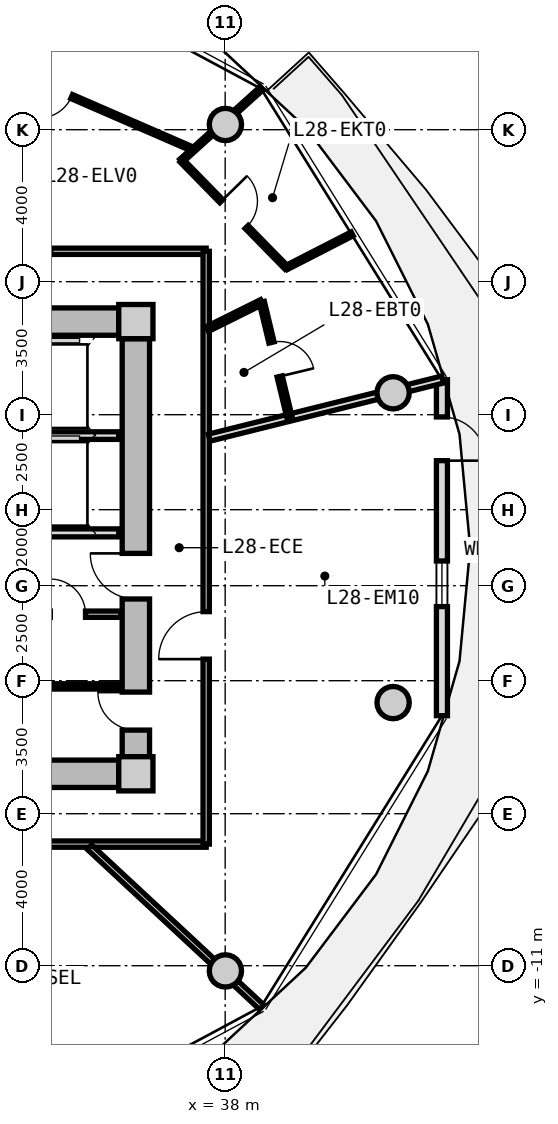
"""IFC4 building model, lengths in metres.
Left out: names, types, materials, properties, quantities, classifications, styles, units other than length and angle.
Written with IfcOpenShell. Run it as: python <this file> out.ifc"""

import sys

from ifc_helpers import new_model, si_unit, direction, frame, frame_2d, origin, origin_2d, place, context, subcontext, project, spatial, rectangle, circle, extrude, source, transform, mapped, element, fill, save


model = new_model("IFC4")
c1 = context("Model", 3, precision=1e-05, world=origin(), true_north=direction((0.0, 1.0)))
c2 = subcontext(c1, "Body", "Model", "MODEL_VIEW")
j1 = project(units=[si_unit("LENGTHUNIT", "METRE"), si_unit("PLANEANGLEUNIT", "RADIAN")], contexts=[c1])
p1 = place(None, origin())
s1 = spatial("IfcSite", under=j1, at=p1, CompositionType="ELEMENT")
p2 = place(p1, origin())
s2 = spatial("IfcBuilding", under=s1, at=p2, CompositionType="ELEMENT")
p3 = place(p2, frame((0.0, 0.0, 93.2)))
s3 = spatial("IfcBuildingStorey", under=s2, at=p3, CompositionType="ELEMENT", Elevation=93.2)
m1 = source(origin(), c2, "Body", "SweptSolid", [
    extrude(rectangle(XDim=0.9, YDim=0.9, at=origin_2d()), origin(), (0.0, 0.0, 1.0), 3.05),
])
for number, where, z_axis, x_axis in (
    (1, (35.65, -5.95, 0.0), (0.0, 0.0, 1.0), (1.0, 0.0, 0.0)),
    (2, (35.65, 5.95, 0.0), (0.0, 0.0, 1.0), (1.0, 0.0, 0.0)),
):
    element("IfcColumn", number, at=place(p3, frame(where, z_axis=z_axis, x_axis=x_axis)), inside=s3, PredefinedType="COLUMN", context=c2, shape_type="MappedRepresentation", body=[
        mapped(m1, transform((0.0, 0.0, 0.0), x_axis=(1.0, 0.0, 0.0), y_axis=(0.0, 1.0, 0.0), z_axis=(0.0, 0.0, 1.0), scale=1.0)),
    ])
m2 = source(origin(), c2, "Body", "SweptSolid", [
    extrude(rectangle(XDim=14.4, YDim=0.72, at=frame_2d((7.2, 0.0))), origin(), (0.0, 0.0, 1.0), 2.79),
])
for number, where, z_axis, x_axis in (
    (3, (20.8, 5.95, 0.0), (0.0, 0.0, 1.0), (1.0, 0.0, 0.0)),
    (4, (35.2, -5.95, 0.0), (0.0, 0.0, 1.0), (-1.0, 0.0, 0.0)),
):
    element("IfcWall", number, at=place(p3, frame(where, z_axis=z_axis, x_axis=x_axis)), inside=s3, PredefinedType="SHEAR", context=c2, shape_type="MappedRepresentation", body=[
        mapped(m2, transform((0.0, 0.0, 0.0), x_axis=(1.0, 0.0, 0.0), y_axis=(0.0, 1.0, 0.0), z_axis=(0.0, 0.0, 1.0), scale=1.0)),
    ])
m3 = source(origin(), c2, "Body", "SweptSolid", [
    extrude(rectangle(XDim=11.0, YDim=0.72, at=frame_2d((5.5, 0.0))), origin(), (0.0, 0.0, 1.0), 2.79),
])
p4 = place(p3, frame((35.65, 5.5, 0.0), z_axis=(0.0, 0.0, 1.0), x_axis=(0.0, -1.0, 0.0)))
e5 = element("IfcWall", 5, at=p4, inside=s3, PredefinedType="SHEAR", context=c2, shape_type="MappedRepresentation", body=[
    mapped(m3, transform((0.0, 0.0, 0.0), x_axis=(1.0, 0.0, 0.0), y_axis=(0.0, 1.0, 0.0), z_axis=(0.0, 0.0, 1.0), scale=1.0)),
])
p5 = place(p4, frame((5.65, 0.0, 0.0)))
e6 = element("IfcOpeningElement", 6, at=p5, cuts=e5, PredefinedType="OPENING", context=c2, shape_type="SweptSolid", body=[
    extrude(rectangle(XDim=1.2, YDim=2.15, at=frame_2d((0.6, 1.075))), frame((0.0, 0.37, 0.0), z_axis=(0.0, -1.0, 0.0), x_axis=(1.0, 0.0, 0.0)), (0.0, 0.0, 1.0), 0.74),
])
p6 = place(p4, frame((9.3, 0.0, 0.0)))
e7 = element("IfcOpeningElement", 7, at=p6, cuts=e5, PredefinedType="OPENING", context=c2, shape_type="SweptSolid", body=[
    extrude(rectangle(XDim=1.0, YDim=2.1, at=frame_2d((0.5, 1.05))), frame((0.0, 0.37, 0.0), z_axis=(0.0, -1.0, 0.0), x_axis=(1.0, 0.0, 0.0)), (0.0, 0.0, 1.0), 0.74),
])
m4 = source(origin(), c2, "Body", "SweptSolid", [
    extrude(circle(Radius=0.425, at=origin_2d()), origin(), (0.0, 0.0, 1.0), 3.05),
])
for number, where, z_axis, x_axis in (
    (8, (42.419, 4.076, 0.0), (0.0, 0.0, 1.0), (1.0, 0.0, 0.0)),
    (9, (38.006, 11.137, 0.0), (0.0, 0.0, 1.0), (1.0, 0.0, 0.0)),
    (10, (38.006, -11.137, 0.0), (0.0, 0.0, 1.0), (1.0, 0.0, 0.0)),
    (11, (42.419, -4.076, 0.0), (0.0, 0.0, 1.0), (1.0, 0.0, 0.0)),
):
    element("IfcColumn", number, at=place(p3, frame(where, z_axis=z_axis, x_axis=x_axis)), inside=s3, PredefinedType="COLUMN", context=c2, shape_type="MappedRepresentation", body=[
        mapped(m4, transform((0.0, 0.0, 0.0), x_axis=(1.0, 0.0, 0.0), y_axis=(0.0, 1.0, 0.0), z_axis=(0.0, 0.0, 1.0), scale=1.0)),
    ])
m5 = source(origin(), c2, "Body", "SweptSolid", [
    extrude(rectangle(XDim=8.841, YDim=0.29, at=frame_2d((4.421, 0.0))), origin(), (0.0, 0.0, 1.0), 2.79),
])
p7 = place(p3, frame((43.704, 4.421, 0.0), z_axis=(0.0, 0.0, 1.0), x_axis=(0.0, -1.0, 0.0)))
e12 = element("IfcWall", 12, at=p7, inside=s3, PredefinedType="SOLIDWALL", context=c2, shape_type="MappedRepresentation", body=[
    mapped(m5, transform((0.0, 0.0, 0.0), x_axis=(1.0, 0.0, 0.0), y_axis=(0.0, 1.0, 0.0), z_axis=(0.0, 0.0, 1.0), scale=1.0)),
])
p8 = place(p7, frame((0.98, 0.0, 0.0)))
e13 = element("IfcOpeningElement", 13, at=p8, cuts=e12, PredefinedType="OPENING", context=c2, shape_type="SweptSolid", body=[
    extrude(rectangle(XDim=1.15, YDim=2.25, at=frame_2d((0.575, 1.125))), frame((0.0, 0.155, 0.0), z_axis=(0.0, -1.0, 0.0), x_axis=(1.0, 0.0, 0.0)), (0.0, 0.0, 1.0), 0.31),
])
p9 = place(p7, frame((4.771, 0.0, 0.85)))
e14 = element("IfcOpeningElement", 14, at=p9, cuts=e12, PredefinedType="OPENING", context=c2, shape_type="SweptSolid", body=[
    extrude(rectangle(XDim=1.2, YDim=1.5, at=frame_2d((0.6, 0.75))), frame((0.0, 0.155, 0.0), z_axis=(0.0, -1.0, 0.0), x_axis=(1.0, 0.0, 0.0)), (0.0, 0.0, 1.0), 0.31),
])
m6 = source(origin(), c2, "Body", "SweptSolid", [
    extrude(rectangle(XDim=3.2, YDim=0.2, at=frame_2d((1.6, 0.0))), origin(), (0.0, 0.0, 1.0), 2.775),
])
p10 = place(p3, frame((32.0, 2.95, 0.0), z_axis=(0.0, 0.0, 1.0), x_axis=(1.0, 0.0, 0.0)))
e15 = element("IfcWall", 15, at=p10, inside=s3, PredefinedType="PARTITIONING", context=c2, shape_type="MappedRepresentation", body=[
    mapped(m6, transform((0.0, 0.0, 0.0), x_axis=(1.0, 0.0, 0.0), y_axis=(0.0, 1.0, 0.0), z_axis=(0.0, 0.0, 1.0), scale=1.0)),
])
m7 = source(origin(), c2, "Body", "SweptSolid", [
    extrude(rectangle(XDim=6.66, YDim=0.21, at=frame_2d((3.33, 0.0))), origin(), (0.0, 0.0, 1.0), 2.775),
])
p11 = place(p3, frame((28.54, 0.39, 0.0), z_axis=(0.0, 0.0, 1.0), x_axis=(1.0, 0.0, 0.0)))
e16 = element("IfcWall", 16, at=p11, inside=s3, PredefinedType="PARTITIONING", context=c2, shape_type="MappedRepresentation", body=[
    mapped(m7, transform((0.0, 0.0, 0.0), x_axis=(1.0, 0.0, 0.0), y_axis=(0.0, 1.0, 0.0), z_axis=(0.0, 0.0, 1.0), scale=1.0)),
])
p12 = place(p11, frame((1.0, 0.0, 0.0)))
e17 = element("IfcOpeningElement", 17, at=p12, cuts=e16, PredefinedType="OPENING", context=c2, shape_type="SweptSolid", body=[
    extrude(rectangle(XDim=1.2, YDim=2.15, at=frame_2d((0.6, 1.075))), frame((0.0, 0.115, 0.0), z_axis=(0.0, -1.0, 0.0), x_axis=(1.0, 0.0, 0.0)), (0.0, 0.0, 1.0), 0.23),
])
m8 = source(origin(), c2, "Body", "SweptSolid", [
    extrude(rectangle(XDim=2.7, YDim=0.165, at=frame_2d((1.35, 0.0))), origin(), (0.0, 0.0, 1.0), 2.775),
])
p13 = place(p3, frame((32.55, -1.75, 0.0), z_axis=(0.0, 0.0, 1.0), x_axis=(1.0, 0.0, 0.0)))
e18 = element("IfcWall", 18, at=p13, inside=s3, PredefinedType="PARTITIONING", context=c2, shape_type="MappedRepresentation", body=[
    mapped(m8, transform((0.0, 0.0, 0.0), x_axis=(1.0, 0.0, 0.0), y_axis=(0.0, 1.0, 0.0), z_axis=(0.0, 0.0, 1.0), scale=1.0)),
])
p14 = place(p13, frame((0.85, 0.0, 0.0)))
e19 = element("IfcOpeningElement", 19, at=p14, cuts=e18, PredefinedType="OPENING", context=c2, shape_type="SweptSolid", body=[
    extrude(rectangle(XDim=0.925, YDim=2.1, at=frame_2d((0.462, 1.05))), frame((0.0, 0.093, 0.0), z_axis=(0.0, -1.0, 0.0), x_axis=(1.0, 0.0, 0.0)), (0.0, 0.0, 1.0), 0.185),
])
m9 = source(origin(), c2, "Body", "SweptSolid", [
    extrude(rectangle(XDim=2.7, YDim=0.14, at=frame_2d((1.35, 0.0))), origin(), (0.0, 0.0, 1.0), 2.775),
])
p15 = place(p3, frame((32.55, -3.65, 0.0), z_axis=(0.0, 0.0, 1.0), x_axis=(1.0, 0.0, 0.0)))
e20 = element("IfcWall", 20, at=p15, inside=s3, PredefinedType="PARTITIONING", context=c2, shape_type="MappedRepresentation", body=[
    mapped(m9, transform((0.0, 0.0, 0.0), x_axis=(1.0, 0.0, 0.0), y_axis=(0.0, 1.0, 0.0), z_axis=(0.0, 0.0, 1.0), scale=1.0)),
])
m10 = source(origin(), c2, "Body", "SweptSolid", [
    extrude(rectangle(XDim=9.234, YDim=0.165, at=frame_2d((4.617, 0.0))), origin(), (0.0, 0.0, 1.0), 2.775),
])
p16 = place(p3, frame((28.266, 7.8, 0.0), z_axis=(0.0, 0.0, 1.0), x_axis=(1.0, 0.0, 0.0)))
e21 = element("IfcWall", 21, at=p16, inside=s3, PredefinedType="PARTITIONING", context=c2, shape_type="MappedRepresentation", body=[
    mapped(m10, transform((0.0, 0.0, 0.0), x_axis=(1.0, 0.0, 0.0), y_axis=(0.0, 1.0, 0.0), z_axis=(0.0, 0.0, 1.0), scale=1.0)),
])
p17 = place(p16, frame((4.092, 0.0, 0.0)))
e22 = element("IfcOpeningElement", 22, at=p17, cuts=e21, PredefinedType="OPENING", context=c2, shape_type="SweptSolid", body=[
    extrude(rectangle(XDim=1.05, YDim=2.15, at=frame_2d((0.525, 1.075))), frame((0.0, 0.093, 0.0), z_axis=(0.0, -1.0, 0.0), x_axis=(1.0, 0.0, 0.0)), (0.0, 0.0, 1.0), 0.185),
])
m11 = source(origin(), c2, "Body", "SweptSolid", [
    extrude(rectangle(XDim=8.6, YDim=0.165, at=frame_2d((4.3, 0.0))), origin(), (0.0, 0.0, 1.0), 2.775),
])
p18 = place(p3, frame((37.5, -7.8, 0.0), z_axis=(0.0, 0.0, 1.0), x_axis=(-1.0, 0.0, 0.0)))
e23 = element("IfcWall", 23, at=p18, inside=s3, PredefinedType="PARTITIONING", context=c2, shape_type="MappedRepresentation", body=[
    mapped(m11, transform((0.0, 0.0, 0.0), x_axis=(1.0, 0.0, 0.0), y_axis=(0.0, 1.0, 0.0), z_axis=(0.0, 0.0, 1.0), scale=1.0)),
])
m12 = source(origin(), c2, "Body", "SweptSolid", [
    extrude(rectangle(XDim=15.6, YDim=0.165, at=frame_2d((7.8, 0.0))), origin(), (0.0, 0.0, 1.0), 2.775),
])
p19 = place(p3, frame((37.5, 7.8, 0.0), z_axis=(0.0, 0.0, 1.0), x_axis=(0.0, -1.0, 0.0)))
e24 = element("IfcWall", 24, at=p19, inside=s3, PredefinedType="PARTITIONING", context=c2, shape_type="MappedRepresentation", body=[
    mapped(m12, transform((0.0, 0.0, 0.0), x_axis=(1.0, 0.0, 0.0), y_axis=(0.0, 1.0, 0.0), z_axis=(0.0, 0.0, 1.0), scale=1.0)),
])
p20 = place(p19, frame((9.482, 0.0, 0.0)))
e25 = element("IfcOpeningElement", 25, at=p20, cuts=e24, PredefinedType="OPENING", context=c2, shape_type="SweptSolid", body=[
    extrude(rectangle(XDim=1.25, YDim=2.2, at=frame_2d((0.625, 1.1))), frame((0.0, 0.093, 0.0), z_axis=(0.0, -1.0, 0.0), x_axis=(1.0, 0.0, 0.0)), (0.0, 0.0, 1.0), 0.185),
])
m13 = source(origin(), c2, "Body", "SweptSolid", [
    extrude(rectangle(XDim=6.187, YDim=0.165, at=frame_2d((3.093, 0.0))), origin(), (0.0, 0.0, 1.0), 2.275),
])
p21 = place(p3, frame((34.429, -7.88, 0.0), z_axis=(0.0, 0.0, 1.0), x_axis=(0.732501077882, -0.680765870841, 0.0)))
e26 = element("IfcWall", 26, at=p21, inside=s3, PredefinedType="PARTITIONING", context=c2, shape_type="MappedRepresentation", body=[
    mapped(m13, transform((0.0, 0.0, 0.0), x_axis=(1.0, 0.0, 0.0), y_axis=(0.0, 1.0, 0.0), z_axis=(0.0, 0.0, 1.0), scale=1.0)),
])
m14 = source(origin(), c2, "Body", "SweptSolid", [
    extrude(rectangle(XDim=6.331, YDim=0.19, at=frame_2d((3.165, 0.0))), origin(), (0.0, 0.0, 1.0), 2.275),
])
p22 = place(p3, frame((37.58, 2.896, 0.0), z_axis=(0.0, 0.0, 1.0), x_axis=(0.97036440661, 0.241646267062, 0.0)))
e27 = element("IfcWall", 27, at=p22, inside=s3, PredefinedType="PARTITIONING", context=c2, shape_type="MappedRepresentation", body=[
    mapped(m14, transform((0.0, 0.0, 0.0), x_axis=(1.0, 0.0, 0.0), y_axis=(0.0, 1.0, 0.0), z_axis=(0.0, 0.0, 1.0), scale=1.0)),
])
m15 = source(origin(), c2, "Body", "SweptSolid", [
    extrude(rectangle(XDim=7.938, YDim=0.115, at=frame_2d((3.969, 0.0))), origin(), (0.0, 0.0, 1.0), 2.775),
])
p23 = place(p3, frame((37.164, 10.479, 0.0), z_axis=(0.0, 0.0, 1.0), x_axis=(-0.917052940979, 0.398765474235, 0.0)))
e28 = element("IfcWall", 28, at=p23, inside=s3, PredefinedType="PARTITIONING", context=c2, shape_type="MappedRepresentation", body=[
    mapped(m15, transform((0.0, 0.0, 0.0), x_axis=(1.0, 0.0, 0.0), y_axis=(0.0, 1.0, 0.0), z_axis=(0.0, 0.0, 1.0), scale=1.0)),
])
p24 = place(p23, frame((3.494, 0.0, 0.0)))
e29 = element("IfcOpeningElement", 29, at=p24, cuts=e28, PredefinedType="OPENING", context=c2, shape_type="SweptSolid", body=[
    extrude(rectangle(XDim=0.95, YDim=2.1, at=frame_2d((0.475, 1.05))), frame((0.0, 0.067, 0.0), z_axis=(0.0, -1.0, 0.0), x_axis=(1.0, 0.0, 0.0)), (0.0, 0.0, 1.0), 0.135),
])
m16 = source(origin(), c2, "Body", "SweptSolid", [
    extrude(rectangle(XDim=2.852, YDim=0.115, at=frame_2d((1.426, 0.0))), origin(), (0.0, 0.0, 1.0), 2.275),
])
p25 = place(p3, frame((36.844, 10.18, 0.0), z_axis=(0.0, 0.0, 1.0), x_axis=(0.742190556634, 0.670188911908, 0.0)))
e30 = element("IfcWall", 30, at=p25, inside=s3, PredefinedType="PARTITIONING", context=c2, shape_type="MappedRepresentation", body=[
    mapped(m16, transform((0.0, 0.0, 0.0), x_axis=(1.0, 0.0, 0.0), y_axis=(0.0, 1.0, 0.0), z_axis=(0.0, 0.0, 1.0), scale=1.0)),
])
m17 = source(origin(), c2, "Body", "SweptSolid", [
    extrude(rectangle(XDim=1.6, YDim=0.14, at=frame_2d((0.8, 0.0))), origin(), (0.0, 0.0, 1.0), 2.775),
])
p26 = place(p3, frame((37.53, 5.754, 0.0), z_axis=(0.0, 0.0, 1.0), x_axis=(0.895522919837, 0.445015393044, 0.0)))
e31 = element("IfcWall", 31, at=p26, inside=s3, PredefinedType="PARTITIONING", context=c2, shape_type="MappedRepresentation", body=[
    mapped(m17, transform((0.0, 0.0, 0.0), x_axis=(1.0, 0.0, 0.0), y_axis=(0.0, 1.0, 0.0), z_axis=(0.0, 0.0, 1.0), scale=1.0)),
])
m18 = source(origin(), c2, "Body", "SweptSolid", [
    extrude(rectangle(XDim=3.112, YDim=0.14, at=frame_2d((1.556, 0.0))), origin(), (0.0, 0.0, 1.0), 2.415),
])
p27 = place(p3, frame((38.963, 6.466, 0.0), z_axis=(0.0, 0.0, 1.0), x_axis=(0.233737944029, -0.972299631555, 0.0)))
e32 = element("IfcWall", 32, at=p27, inside=s3, PredefinedType="PARTITIONING", context=c2, shape_type="MappedRepresentation", body=[
    mapped(m18, transform((0.0, 0.0, 0.0), x_axis=(1.0, 0.0, 0.0), y_axis=(0.0, 1.0, 0.0), z_axis=(0.0, 0.0, 1.0), scale=1.0)),
])
p28 = place(p27, frame((1.096, 0.0, 0.0)))
e33 = element("IfcOpeningElement", 33, at=p28, cuts=e32, PredefinedType="OPENING", context=c2, shape_type="SweptSolid", body=[
    extrude(rectangle(XDim=0.92, YDim=2.1, at=frame_2d((0.46, 1.05))), frame((0.0, 0.08, 0.0), z_axis=(0.0, -1.0, 0.0), x_axis=(1.0, 0.0, 0.0)), (0.0, 0.0, 1.0), 0.16),
])
m19 = source(origin(), c2, "Body", "SweptSolid", [
    extrude(rectangle(XDim=1.945, YDim=0.115, at=frame_2d((0.973, 0.0))), origin(), (0.0, 0.0, 1.0), 2.775),
])
p29 = place(p3, frame((39.611, 7.37, 0.0), z_axis=(0.0, 0.0, 1.0), x_axis=(0.889684148329, 0.456576517368, 0.0)))
e34 = element("IfcWall", 34, at=p29, inside=s3, PredefinedType="PARTITIONING", context=c2, shape_type="MappedRepresentation", body=[
    mapped(m19, transform((0.0, 0.0, 0.0), x_axis=(1.0, 0.0, 0.0), y_axis=(0.0, 1.0, 0.0), z_axis=(0.0, 0.0, 1.0), scale=1.0)),
])
m20 = source(origin(), c2, "Body", "SweptSolid", [
    extrude(rectangle(XDim=3.943, YDim=0.115, at=frame_2d((1.972, 0.0))), origin(), (0.0, 0.0, 1.0), 2.775),
])
p30 = place(p3, frame((39.611, 7.37, 0.0), z_axis=(0.0, 0.0, 1.0), x_axis=(-0.699481885754, 0.714650328134, 0.0)))
e35 = element("IfcWall", 35, at=p30, inside=s3, PredefinedType="PARTITIONING", context=c2, shape_type="MappedRepresentation", body=[
    mapped(m20, transform((0.0, 0.0, 0.0), x_axis=(1.0, 0.0, 0.0), y_axis=(0.0, 1.0, 0.0), z_axis=(0.0, 0.0, 1.0), scale=1.0)),
])
p31 = place(p30, frame((1.497, 0.0, 0.0)))
e36 = element("IfcOpeningElement", 36, at=p31, cuts=e35, PredefinedType="OPENING", context=c2, shape_type="SweptSolid", body=[
    extrude(rectangle(XDim=0.95, YDim=2.1, at=frame_2d((0.475, 1.05))), frame((0.0, 0.067, 0.0), z_axis=(0.0, -1.0, 0.0), x_axis=(1.0, 0.0, 0.0)), (0.0, 0.0, 1.0), 0.135),
])
m21 = source(origin(), c2, "Body", "SweptSolid", [
    extrude(rectangle(XDim=1.15, YDim=2.25, at=frame_2d((0.575, 1.125))), frame((0.0, 0.025, 0.0), z_axis=(0.0, -1.0, 0.0), x_axis=(1.0, 0.0, 0.0)), (0.0, 0.0, 1.0), 0.05),
])
p32 = place(p8, origin())
e37 = element("IfcDoor", 37, at=p32, inside=s3, OperationType="SINGLE_SWING_RIGHT", PredefinedType="DOOR", context=c2, shape_type="MappedRepresentation", body=[
    mapped(m21, transform((0.0, 0.0, 0.0), x_axis=(1.0, 0.0, 0.0), y_axis=(0.0, 1.0, 0.0), z_axis=(0.0, 0.0, 1.0), scale=1.0)),
])
fill(e13, e37)
m22 = source(origin(), c2, "Body", "SweptSolid", [
    extrude(rectangle(XDim=1.2, YDim=1.5, at=frame_2d((0.6, 0.75))), frame((0.0, 0.03, 0.0), z_axis=(0.0, -1.0, 0.0), x_axis=(1.0, 0.0, 0.0)), (0.0, 0.0, 1.0), 0.06),
])
p33 = place(p9, origin())
e38 = element("IfcWindow", 38, at=p33, inside=s3, PartitioningType="SINGLE_PANEL", PredefinedType="WINDOW", context=c2, shape_type="MappedRepresentation", body=[
    mapped(m22, transform((0.0, 0.0, 0.0), x_axis=(1.0, 0.0, 0.0), y_axis=(0.0, 1.0, 0.0), z_axis=(0.0, 0.0, 1.0), scale=1.0)),
])
fill(e14, e38)
m23 = source(origin(), c2, "Body", "SweptSolid", [
    extrude(rectangle(XDim=1.2, YDim=2.15, at=frame_2d((0.6, 1.075))), frame((0.0, 0.025, 0.0), z_axis=(0.0, -1.0, 0.0), x_axis=(1.0, 0.0, 0.0)), (0.0, 0.0, 1.0), 0.05),
])
p34 = place(p5, frame((1.2, 0.0, 0.0), z_axis=(0.0, 0.0, 1.0), x_axis=(-1.0, 0.0, 0.0)))
e39 = element("IfcDoor", 39, at=p34, inside=s3, OperationType="SINGLE_SWING_RIGHT", PredefinedType="DOOR", context=c2, shape_type="MappedRepresentation", body=[
    mapped(m23, transform((0.0, 0.0, 0.0), x_axis=(1.0, 0.0, 0.0), y_axis=(0.0, 1.0, 0.0), z_axis=(0.0, 0.0, 1.0), scale=1.0)),
])
fill(e6, e39)
m24 = source(origin(), c2, "Body", "SweptSolid", [
    extrude(rectangle(XDim=0.925, YDim=2.1, at=frame_2d((0.462, 1.05))), frame((0.0, 0.025, 0.0), z_axis=(0.0, -1.0, 0.0), x_axis=(1.0, 0.0, 0.0)), (0.0, 0.0, 1.0), 0.05),
])
p35 = place(p14, origin())
e40 = element("IfcDoor", 40, at=p35, inside=s3, OperationType="SINGLE_SWING_LEFT", PredefinedType="DOOR", context=c2, shape_type="MappedRepresentation", body=[
    mapped(m24, transform((0.0, 0.0, 0.0), x_axis=(1.0, 0.0, 0.0), y_axis=(0.0, 1.0, 0.0), z_axis=(0.0, 0.0, 1.0), scale=1.0)),
])
fill(e19, e40)
m25 = source(origin(), c2, "Body", "SweptSolid", [
    extrude(rectangle(XDim=1.0, YDim=2.1, at=frame_2d((0.5, 1.05))), frame((0.0, 0.025, 0.0), z_axis=(0.0, -1.0, 0.0), x_axis=(1.0, 0.0, 0.0)), (0.0, 0.0, 1.0), 0.05),
])
p36 = place(p6, frame((1.0, 0.0, 0.0), z_axis=(0.0, 0.0, 1.0), x_axis=(-1.0, 0.0, 0.0)))
e41 = element("IfcDoor", 41, at=p36, inside=s3, OperationType="SINGLE_SWING_RIGHT", PredefinedType="DOOR", context=c2, shape_type="MappedRepresentation", body=[
    mapped(m25, transform((0.0, 0.0, 0.0), x_axis=(1.0, 0.0, 0.0), y_axis=(0.0, 1.0, 0.0), z_axis=(0.0, 0.0, 1.0), scale=1.0)),
])
fill(e7, e41)
m26 = source(origin(), c2, "Body", "SweptSolid", [
    extrude(rectangle(XDim=1.25, YDim=2.2, at=frame_2d((0.625, 1.1))), frame((0.0, 0.025, 0.0), z_axis=(0.0, -1.0, 0.0), x_axis=(1.0, 0.0, 0.0)), (0.0, 0.0, 1.0), 0.05),
])
p37 = place(p20, frame((1.25, 0.0, 0.0), z_axis=(0.0, 0.0, 1.0), x_axis=(-1.0, 0.0, 0.0)))
e42 = element("IfcDoor", 42, at=p37, inside=s3, OperationType="SINGLE_SWING_LEFT", PredefinedType="DOOR", context=c2, shape_type="MappedRepresentation", body=[
    mapped(m26, transform((0.0, 0.0, 0.0), x_axis=(1.0, 0.0, 0.0), y_axis=(0.0, 1.0, 0.0), z_axis=(0.0, 0.0, 1.0), scale=1.0)),
])
fill(e25, e42)
m27 = source(origin(), c2, "Body", "SweptSolid", [
    extrude(rectangle(XDim=0.92, YDim=2.1, at=frame_2d((0.46, 1.05))), frame((0.0, 0.025, 0.0), z_axis=(0.0, -1.0, 0.0), x_axis=(1.0, 0.0, 0.0)), (0.0, 0.0, 1.0), 0.05),
])
p38 = place(p28, origin())
e43 = element("IfcDoor", 43, at=p38, inside=s3, OperationType="SINGLE_SWING_RIGHT", PredefinedType="DOOR", context=c2, shape_type="MappedRepresentation", body=[
    mapped(m27, transform((0.0, 0.0, 0.0), x_axis=(1.0, 0.0, 0.0), y_axis=(0.0, 1.0, 0.0), z_axis=(0.0, 0.0, 1.0), scale=1.0)),
])
fill(e33, e43)
m28 = source(origin(), c2, "Body", "SweptSolid", [
    extrude(rectangle(XDim=0.95, YDim=2.1, at=frame_2d((0.475, 1.05))), frame((0.0, 0.025, 0.0), z_axis=(0.0, -1.0, 0.0), x_axis=(1.0, 0.0, 0.0)), (0.0, 0.0, 1.0), 0.05),
])
p39 = place(p31, frame((0.95, 0.0, 0.0), z_axis=(0.0, 0.0, 1.0), x_axis=(-1.0, 0.0, 0.0)))
e44 = element("IfcDoor", 44, at=p39, inside=s3, OperationType="SINGLE_SWING_LEFT", PredefinedType="DOOR", context=c2, shape_type="MappedRepresentation", body=[
    mapped(m28, transform((0.0, 0.0, 0.0), x_axis=(1.0, 0.0, 0.0), y_axis=(0.0, 1.0, 0.0), z_axis=(0.0, 0.0, 1.0), scale=1.0)),
])
fill(e36, e44)
p40 = place(p24, origin())
e45 = element("IfcDoor", 45, at=p40, inside=s3, OperationType="SINGLE_SWING_RIGHT", PredefinedType="DOOR", context=c2, shape_type="MappedRepresentation", body=[
    mapped(m28, transform((0.0, 0.0, 0.0), x_axis=(1.0, 0.0, 0.0), y_axis=(0.0, 1.0, 0.0), z_axis=(0.0, 0.0, 1.0), scale=1.0)),
])
fill(e29, e45)
save(model, sys.argv[1])
